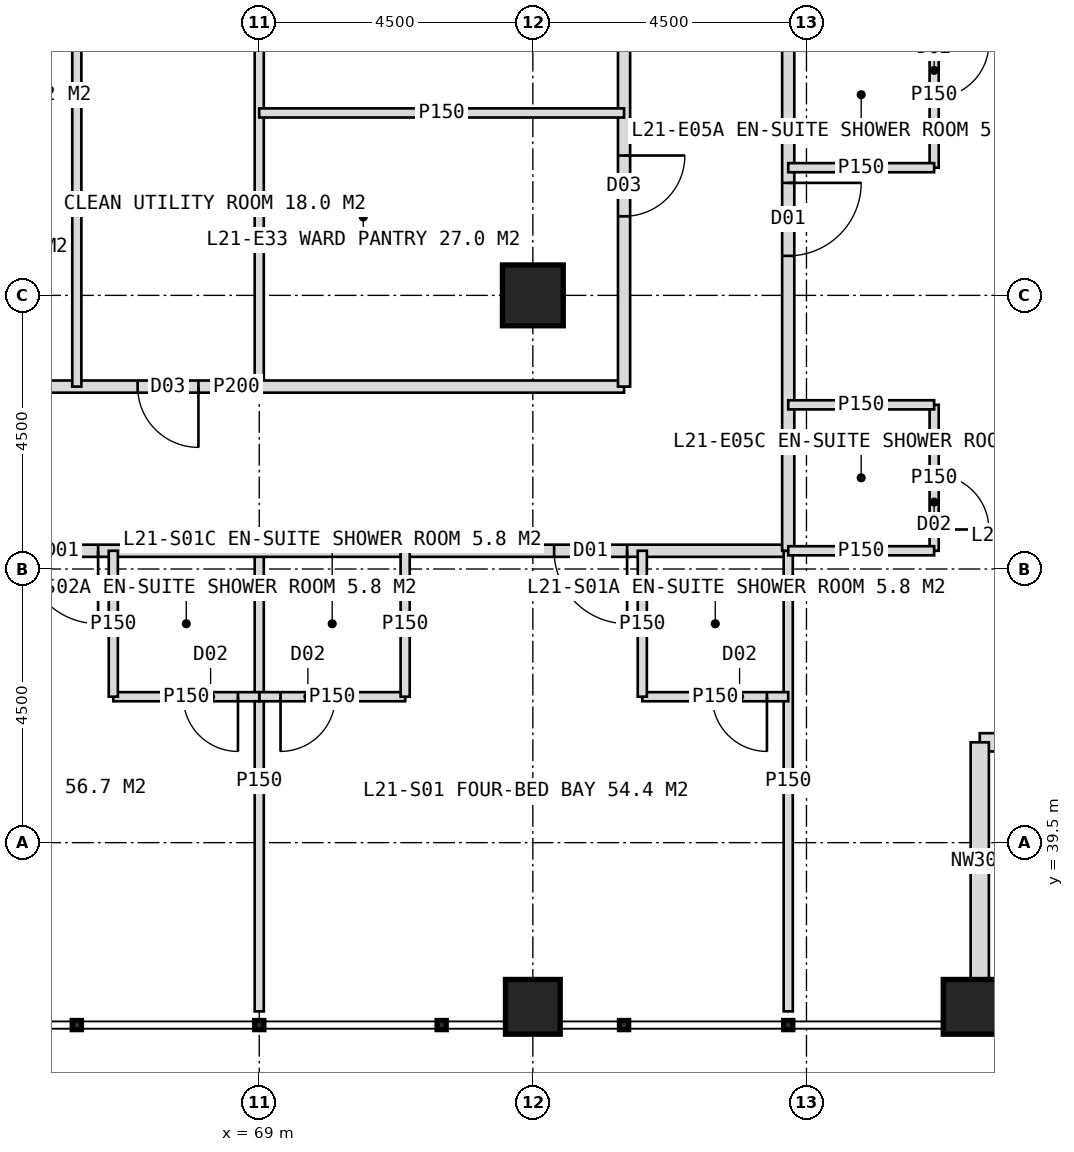
"""IFC4 building model, lengths in metres.
Left out: names, types, materials, properties, quantities, classifications, styles, units other than length and angle.
Written with IfcOpenShell. Run it as: python <this file> out.ifc"""

import sys

from ifc_helpers import new_model, si_unit, direction, frame, frame_2d, origin, origin_2d, place, context, subcontext, project, spatial, rectangle, hollow_rectangle, extrude, element, fill, save


model = new_model("IFC4")
c1 = context("Model", 3, precision=1e-05, world=origin(), true_north=direction((0.0, 1.0)))
c2 = subcontext(c1, "Body", "Model", "MODEL_VIEW")
j1 = project(units=[si_unit("LENGTHUNIT", "METRE"), si_unit("PLANEANGLEUNIT", "RADIAN")], contexts=[c1])
p1 = place(None, origin())
s1 = spatial("IfcSite", under=j1, at=p1, CompositionType="ELEMENT")
p2 = place(p1, origin())
s2 = spatial("IfcBuilding", under=s1, at=p2, CompositionType="ELEMENT")
p3 = place(p2, frame((0.0, 0.0, 91.0)))
s3 = spatial("IfcBuildingStorey", under=s2, at=p3, CompositionType="ELEMENT", Elevation=91.0)
p4 = place(p3, frame((73.5, 48.5, 0.0), z_axis=(0.0, 0.0, 1.0), x_axis=(1.0, 0.0, 0.0)))
e1 = element("IfcColumn", 1, at=p4, inside=s3, PredefinedType="COLUMN", context=c2, shape_type="SweptSolid", body=[
    extrude(hollow_rectangle(XDim=1.0, YDim=1.0, WallThickness=0.1, at=origin_2d()), origin(), (0.0, 0.0, 1.0), 4.0),
])
for number, where, z_axis, x_axis in (
    (2, (73.5, 36.8, 0.0), (0.0, 0.0, 1.0), (1.0, 0.0, 0.0)),
    (3, (80.7, 36.8, 0.0), (0.0, 0.0, 1.0), (1.0, 0.0, 0.0)),
):
    element("IfcColumn", number, at=place(p3, frame(where, z_axis=z_axis, x_axis=x_axis)), inside=s3, PredefinedType="COLUMN", context=c2, shape_type="SweptSolid", body=[
        extrude(hollow_rectangle(XDim=0.9, YDim=0.9, WallThickness=0.08, at=origin_2d()), origin(), (0.0, 0.0, 1.0), 4.0),
    ])
for number, where, z_axis, x_axis in (
    (4, (84.75, 41.15, 0.0), (0.0, 0.0, 1.0), (-1.0, 0.0, 0.0)),
    (5, (80.85, 41.15, 0.0), (0.0, 0.0, 1.0), (0.0, -1.0, 0.0)),
):
    element("IfcWall", number, at=place(p3, frame(where, z_axis=z_axis, x_axis=x_axis)), inside=s3, PredefinedType="ELEMENTEDWALL", context=c2, shape_type="SweptSolid", body=[
        extrude(rectangle(XDim=3.9, YDim=0.3, at=frame_2d((1.95, 0.0))), origin(), (0.0, 0.0, 1.0), 2.95),
    ])
p5 = place(p3, frame((69.0, 44.3, 0.0), z_axis=(0.0, 0.0, 1.0), x_axis=(0.0, -1.0, 0.0)))
e6 = element("IfcWall", 6, at=p5, inside=s3, PredefinedType="PARTITIONING", context=c2, shape_type="SweptSolid", body=[
    extrude(rectangle(XDim=7.575, YDim=0.15, at=frame_2d((3.788, 0.0))), origin(), (0.0, 0.0, 1.0), 3.75),
])
p6 = place(p3, frame((77.7, 44.3, 0.0), z_axis=(0.0, 0.0, 1.0), x_axis=(-1.0, 0.0, 0.0)))
e7 = element("IfcWall", 7, at=p6, inside=s3, PredefinedType="PARTITIONING", context=c2, shape_type="SweptSolid", body=[
    extrude(rectangle(XDim=35.4, YDim=0.2, at=frame_2d((17.7, 0.0))), origin(), (0.0, 0.0, 1.0), 3.75),
])
p7 = place(p6, frame((2.65, 0.0, 0.0)))
e8 = element("IfcOpeningElement", 8, at=p7, cuts=e7, PredefinedType="OPENING", context=c2, shape_type="SweptSolid", body=[
    extrude(rectangle(XDim=1.2, YDim=2.2, at=frame_2d((0.6, 1.1))), frame((0.0, 0.11, 0.0), z_axis=(0.0, -1.0, 0.0), x_axis=(1.0, 0.0, 0.0)), (0.0, 0.0, 1.0), 0.22),
])
p8 = place(p6, frame((11.35, 0.0, 0.0)))
e9 = element("IfcOpeningElement", 9, at=p8, cuts=e7, PredefinedType="OPENING", context=c2, shape_type="SweptSolid", body=[
    extrude(rectangle(XDim=1.2, YDim=2.2, at=frame_2d((0.6, 1.1))), frame((0.0, 0.11, 0.0), z_axis=(0.0, -1.0, 0.0), x_axis=(1.0, 0.0, 0.0)), (0.0, 0.0, 1.0), 0.22),
])
p9 = place(p6, frame((20.35, 0.0, 0.0)))
e10 = element("IfcOpeningElement", 10, at=p9, cuts=e7, PredefinedType="OPENING", context=c2, shape_type="SweptSolid", body=[
    extrude(rectangle(XDim=1.2, YDim=2.2, at=frame_2d((0.6, 1.1))), frame((0.0, 0.11, 0.0), z_axis=(0.0, -1.0, 0.0), x_axis=(1.0, 0.0, 0.0)), (0.0, 0.0, 1.0), 0.22),
])
p10 = place(p6, frame((29.35, 0.0, 0.0)))
e11 = element("IfcOpeningElement", 11, at=p10, cuts=e7, PredefinedType="OPENING", context=c2, shape_type="SweptSolid", body=[
    extrude(rectangle(XDim=1.2, YDim=2.2, at=frame_2d((0.6, 1.1))), frame((0.0, 0.11, 0.0), z_axis=(0.0, -1.0, 0.0), x_axis=(1.0, 0.0, 0.0)), (0.0, 0.0, 1.0), 0.22),
])
p11 = place(p3, frame((77.7, 44.3, 0.0), z_axis=(0.0, 0.0, 1.0), x_axis=(0.0, -1.0, 0.0)))
e12 = element("IfcWall", 12, at=p11, inside=s3, PredefinedType="PARTITIONING", context=c2, shape_type="SweptSolid", body=[
    extrude(rectangle(XDim=7.575, YDim=0.15, at=frame_2d((3.788, 0.0))), origin(), (0.0, 0.0, 1.0), 3.75),
])
p12 = place(p3, frame((77.7, 41.9, 0.0), z_axis=(0.0, 0.0, 1.0), x_axis=(-1.0, 0.0, 0.0)))
e13 = element("IfcWall", 13, at=p12, inside=s3, PredefinedType="PARTITIONING", context=c2, shape_type="SweptSolid", body=[
    extrude(rectangle(XDim=2.4, YDim=0.15, at=frame_2d((1.2, 0.0))), origin(), (0.0, 0.0, 1.0), 3.75),
])
p13 = place(p12, frame((0.35, 0.0, 0.0)))
e14 = element("IfcOpeningElement", 14, at=p13, cuts=e13, PredefinedType="OPENING", context=c2, shape_type="SweptSolid", body=[
    extrude(rectangle(XDim=0.9, YDim=2.1, at=frame_2d((0.45, 1.05))), frame((0.0, 0.085, 0.0), z_axis=(0.0, -1.0, 0.0), x_axis=(1.0, 0.0, 0.0)), (0.0, 0.0, 1.0), 0.17),
])
p14 = place(p3, frame((75.3, 44.3, 0.0), z_axis=(0.0, 0.0, 1.0), x_axis=(0.0, -1.0, 0.0)))
e15 = element("IfcWall", 15, at=p14, inside=s3, PredefinedType="PARTITIONING", context=c2, shape_type="SweptSolid", body=[
    extrude(rectangle(XDim=2.4, YDim=0.15, at=frame_2d((1.2, 0.0))), origin(), (0.0, 0.0, 1.0), 3.75),
])
p15 = place(p3, frame((71.4, 41.9, 0.0), z_axis=(0.0, 0.0, 1.0), x_axis=(-1.0, 0.0, 0.0)))
e16 = element("IfcWall", 16, at=p15, inside=s3, PredefinedType="PARTITIONING", context=c2, shape_type="SweptSolid", body=[
    extrude(rectangle(XDim=2.4, YDim=0.15, at=frame_2d((1.2, 0.0))), origin(), (0.0, 0.0, 1.0), 3.75),
])
p16 = place(p15, frame((1.15, 0.0, 0.0)))
e17 = element("IfcOpeningElement", 17, at=p16, cuts=e16, PredefinedType="OPENING", context=c2, shape_type="SweptSolid", body=[
    extrude(rectangle(XDim=0.9, YDim=2.1, at=frame_2d((0.45, 1.05))), frame((0.0, 0.085, 0.0), z_axis=(0.0, -1.0, 0.0), x_axis=(1.0, 0.0, 0.0)), (0.0, 0.0, 1.0), 0.17),
])
p17 = place(p3, frame((71.4, 44.3, 0.0), z_axis=(0.0, 0.0, 1.0), x_axis=(0.0, -1.0, 0.0)))
e18 = element("IfcWall", 18, at=p17, inside=s3, PredefinedType="PARTITIONING", context=c2, shape_type="SweptSolid", body=[
    extrude(rectangle(XDim=2.4, YDim=0.15, at=frame_2d((1.2, 0.0))), origin(), (0.0, 0.0, 1.0), 3.75),
])
p18 = place(p3, frame((69.0, 41.9, 0.0), z_axis=(0.0, 0.0, 1.0), x_axis=(-1.0, 0.0, 0.0)))
e19 = element("IfcWall", 19, at=p18, inside=s3, PredefinedType="PARTITIONING", context=c2, shape_type="SweptSolid", body=[
    extrude(rectangle(XDim=2.4, YDim=0.15, at=frame_2d((1.2, 0.0))), origin(), (0.0, 0.0, 1.0), 3.75),
])
p19 = place(p18, frame((0.35, 0.0, 0.0)))
e20 = element("IfcOpeningElement", 20, at=p19, cuts=e19, PredefinedType="OPENING", context=c2, shape_type="SweptSolid", body=[
    extrude(rectangle(XDim=0.9, YDim=2.1, at=frame_2d((0.45, 1.05))), frame((0.0, 0.085, 0.0), z_axis=(0.0, -1.0, 0.0), x_axis=(1.0, 0.0, 0.0)), (0.0, 0.0, 1.0), 0.17),
])
p20 = place(p3, frame((66.6, 44.3, 0.0), z_axis=(0.0, 0.0, 1.0), x_axis=(0.0, -1.0, 0.0)))
e21 = element("IfcWall", 21, at=p20, inside=s3, PredefinedType="PARTITIONING", context=c2, shape_type="SweptSolid", body=[
    extrude(rectangle(XDim=2.4, YDim=0.15, at=frame_2d((1.2, 0.0))), origin(), (0.0, 0.0, 1.0), 3.75),
])
p21 = place(p3, frame((69.0, 53.0, 0.0), z_axis=(0.0, 0.0, 1.0), x_axis=(0.0, -1.0, 0.0)))
e22 = element("IfcWall", 22, at=p21, inside=s3, PredefinedType="PARTITIONING", context=c2, shape_type="SweptSolid", body=[
    extrude(rectangle(XDim=6.0, YDim=0.15, at=frame_2d((3.0, 0.0))), origin(), (0.0, 0.0, 1.0), 3.75),
])
p22 = place(p3, frame((75.0, 47.0, 0.0), z_axis=(0.0, 0.0, 1.0), x_axis=(-1.0, 0.0, 0.0)))
e23 = element("IfcWall", 23, at=p22, inside=s3, PredefinedType="PARTITIONING", context=c2, shape_type="SweptSolid", body=[
    extrude(rectangle(XDim=12.75, YDim=0.2, at=frame_2d((6.375, 0.0))), origin(), (0.0, 0.0, 1.0), 3.75),
])
p23 = place(p22, frame((7.0, 0.0, 0.0)))
e24 = element("IfcOpeningElement", 24, at=p23, cuts=e23, PredefinedType="OPENING", context=c2, shape_type="SweptSolid", body=[
    extrude(rectangle(XDim=1.0, YDim=2.1, at=frame_2d((0.5, 1.05))), frame((0.0, 0.11, 0.0), z_axis=(0.0, -1.0, 0.0), x_axis=(1.0, 0.0, 0.0)), (0.0, 0.0, 1.0), 0.22),
])
p24 = place(p22, frame((11.425, 0.0, 0.0)))
e25 = element("IfcOpeningElement", 25, at=p24, cuts=e23, PredefinedType="OPENING", context=c2, shape_type="SweptSolid", body=[
    extrude(rectangle(XDim=1.0, YDim=2.1, at=frame_2d((0.5, 1.05))), frame((0.0, 0.11, 0.0), z_axis=(0.0, -1.0, 0.0), x_axis=(1.0, 0.0, 0.0)), (0.0, 0.0, 1.0), 0.22),
])
p25 = place(p3, frame((66.0, 53.0, 0.0), z_axis=(0.0, 0.0, 1.0), x_axis=(0.0, -1.0, 0.0)))
e26 = element("IfcWall", 26, at=p25, inside=s3, PredefinedType="PARTITIONING", context=c2, shape_type="SweptSolid", body=[
    extrude(rectangle(XDim=6.0, YDim=0.15, at=frame_2d((3.0, 0.0))), origin(), (0.0, 0.0, 1.0), 3.75),
])
p26 = place(p3, frame((77.7, 79.7, 0.0), z_axis=(0.0, 0.0, 1.0), x_axis=(0.0, -1.0, 0.0)))
e27 = element("IfcWall", 27, at=p26, inside=s3, PredefinedType="PARTITIONING", context=c2, shape_type="SweptSolid", body=[
    extrude(rectangle(XDim=35.4, YDim=0.2, at=frame_2d((17.7, 0.0))), origin(), (0.0, 0.0, 1.0), 3.75),
])
p27 = place(p26, frame((2.65, 0.0, 0.0)))
e28 = element("IfcOpeningElement", 28, at=p27, cuts=e27, PredefinedType="OPENING", context=c2, shape_type="SweptSolid", body=[
    extrude(rectangle(XDim=1.2, YDim=2.2, at=frame_2d((0.6, 1.1))), frame((0.0, 0.11, 0.0), z_axis=(0.0, -1.0, 0.0), x_axis=(1.0, 0.0, 0.0)), (0.0, 0.0, 1.0), 0.22),
])
p28 = place(p26, frame((8.35, 0.0, 0.0)))
e29 = element("IfcOpeningElement", 29, at=p28, cuts=e27, PredefinedType="OPENING", context=c2, shape_type="SweptSolid", body=[
    extrude(rectangle(XDim=1.2, YDim=2.2, at=frame_2d((0.6, 1.1))), frame((0.0, 0.11, 0.0), z_axis=(0.0, -1.0, 0.0), x_axis=(1.0, 0.0, 0.0)), (0.0, 0.0, 1.0), 0.22),
])
p29 = place(p26, frame((14.35, 0.0, 0.0)))
e30 = element("IfcOpeningElement", 30, at=p29, cuts=e27, PredefinedType="OPENING", context=c2, shape_type="SweptSolid", body=[
    extrude(rectangle(XDim=1.2, YDim=2.2, at=frame_2d((0.6, 1.1))), frame((0.0, 0.11, 0.0), z_axis=(0.0, -1.0, 0.0), x_axis=(1.0, 0.0, 0.0)), (0.0, 0.0, 1.0), 0.22),
])
p30 = place(p26, frame((20.35, 0.0, 0.0)))
e31 = element("IfcOpeningElement", 31, at=p30, cuts=e27, PredefinedType="OPENING", context=c2, shape_type="SweptSolid", body=[
    extrude(rectangle(XDim=1.2, YDim=2.2, at=frame_2d((0.6, 1.1))), frame((0.0, 0.11, 0.0), z_axis=(0.0, -1.0, 0.0), x_axis=(1.0, 0.0, 0.0)), (0.0, 0.0, 1.0), 0.22),
])
p31 = place(p26, frame((29.35, 0.0, 0.0)))
e32 = element("IfcOpeningElement", 32, at=p31, cuts=e27, PredefinedType="OPENING", context=c2, shape_type="SweptSolid", body=[
    extrude(rectangle(XDim=1.2, YDim=2.2, at=frame_2d((0.6, 1.1))), frame((0.0, 0.11, 0.0), z_axis=(0.0, -1.0, 0.0), x_axis=(1.0, 0.0, 0.0)), (0.0, 0.0, 1.0), 0.22),
])
p32 = place(p3, frame((80.1, 53.0, 0.0), z_axis=(0.0, 0.0, 1.0), x_axis=(0.0, -1.0, 0.0)))
e33 = element("IfcWall", 33, at=p32, inside=s3, PredefinedType="PARTITIONING", context=c2, shape_type="SweptSolid", body=[
    extrude(rectangle(XDim=2.4, YDim=0.15, at=frame_2d((1.2, 0.0))), origin(), (0.0, 0.0, 1.0), 3.75),
])
p33 = place(p32, frame((0.35, 0.0, 0.0)))
e34 = element("IfcOpeningElement", 34, at=p33, cuts=e33, PredefinedType="OPENING", context=c2, shape_type="SweptSolid", body=[
    extrude(rectangle(XDim=0.9, YDim=2.1, at=frame_2d((0.45, 1.05))), frame((0.0, 0.085, 0.0), z_axis=(0.0, -1.0, 0.0), x_axis=(1.0, 0.0, 0.0)), (0.0, 0.0, 1.0), 0.17),
])
p34 = place(p3, frame((77.7, 50.6, 0.0), z_axis=(0.0, 0.0, 1.0), x_axis=(1.0, 0.0, 0.0)))
e35 = element("IfcWall", 35, at=p34, inside=s3, PredefinedType="PARTITIONING", context=c2, shape_type="SweptSolid", body=[
    extrude(rectangle(XDim=2.4, YDim=0.15, at=frame_2d((1.2, 0.0))), origin(), (0.0, 0.0, 1.0), 3.75),
])
p35 = place(p3, frame((80.1, 46.7, 0.0), z_axis=(0.0, 0.0, 1.0), x_axis=(0.0, -1.0, 0.0)))
e36 = element("IfcWall", 36, at=p35, inside=s3, PredefinedType="PARTITIONING", context=c2, shape_type="SweptSolid", body=[
    extrude(rectangle(XDim=2.4, YDim=0.15, at=frame_2d((1.2, 0.0))), origin(), (0.0, 0.0, 1.0), 3.75),
])
p36 = place(p35, frame((1.15, 0.0, 0.0)))
e37 = element("IfcOpeningElement", 37, at=p36, cuts=e36, PredefinedType="OPENING", context=c2, shape_type="SweptSolid", body=[
    extrude(rectangle(XDim=0.9, YDim=2.1, at=frame_2d((0.45, 1.05))), frame((0.0, 0.085, 0.0), z_axis=(0.0, -1.0, 0.0), x_axis=(1.0, 0.0, 0.0)), (0.0, 0.0, 1.0), 0.17),
])
for number, where, z_axis, x_axis in (
    (38, (77.7, 46.7, 0.0), (0.0, 0.0, 1.0), (1.0, 0.0, 0.0)),
    (39, (77.7, 44.3, 0.0), (0.0, 0.0, 1.0), (1.0, 0.0, 0.0)),
):
    element("IfcWall", number, at=place(p3, frame(where, z_axis=z_axis, x_axis=x_axis)), inside=s3, PredefinedType="PARTITIONING", context=c2, shape_type="SweptSolid", body=[
        extrude(rectangle(XDim=2.4, YDim=0.15, at=frame_2d((1.2, 0.0))), origin(), (0.0, 0.0, 1.0), 3.75),
    ])
p37 = place(p3, frame((75.0, 62.0, 0.0), z_axis=(0.0, 0.0, 1.0), x_axis=(0.0, -1.0, 0.0)))
e40 = element("IfcWall", 40, at=p37, inside=s3, PredefinedType="PARTITIONING", context=c2, shape_type="SweptSolid", body=[
    extrude(rectangle(XDim=15.0, YDim=0.2, at=frame_2d((7.5, 0.0))), origin(), (0.0, 0.0, 1.0), 3.75),
])
p38 = place(p37, frame((7.3, 0.0, 0.0)))
e41 = element("IfcOpeningElement", 41, at=p38, cuts=e40, PredefinedType="OPENING", context=c2, shape_type="SweptSolid", body=[
    extrude(rectangle(XDim=1.0, YDim=2.1, at=frame_2d((0.5, 1.05))), frame((0.0, 0.11, 0.0), z_axis=(0.0, -1.0, 0.0), x_axis=(1.0, 0.0, 0.0)), (0.0, 0.0, 1.0), 0.22),
])
p39 = place(p37, frame((11.2, 0.0, 0.0)))
e42 = element("IfcOpeningElement", 42, at=p39, cuts=e40, PredefinedType="OPENING", context=c2, shape_type="SweptSolid", body=[
    extrude(rectangle(XDim=1.0, YDim=2.1, at=frame_2d((0.5, 1.05))), frame((0.0, 0.11, 0.0), z_axis=(0.0, -1.0, 0.0), x_axis=(1.0, 0.0, 0.0)), (0.0, 0.0, 1.0), 0.22),
])
p40 = place(p3, frame((69.0, 51.5, 0.0), z_axis=(0.0, 0.0, 1.0), x_axis=(1.0, 0.0, 0.0)))
e43 = element("IfcWall", 43, at=p40, inside=s3, PredefinedType="PARTITIONING", context=c2, shape_type="SweptSolid", body=[
    extrude(rectangle(XDim=6.0, YDim=0.15, at=frame_2d((3.0, 0.0))), origin(), (0.0, 0.0, 1.0), 3.75),
])
p41 = place(p7, origin())
e44 = element("IfcDoor", 44, at=p41, inside=s3, OperationType="SINGLE_SWING_LEFT", PredefinedType="DOOR", context=c2, shape_type="SweptSolid", body=[
    extrude(rectangle(XDim=1.2, YDim=2.2, at=frame_2d((0.6, 1.1))), frame((0.0, 0.025, 0.0), z_axis=(0.0, -1.0, 0.0), x_axis=(1.0, 0.0, 0.0)), (0.0, 0.0, 1.0), 0.05),
])
fill(e8, e44)
p42 = place(p13, origin())
e45 = element("IfcDoor", 45, at=p42, inside=s3, OperationType="SINGLE_SWING_LEFT", PredefinedType="DOOR", context=c2, shape_type="SweptSolid", body=[
    extrude(rectangle(XDim=0.9, YDim=2.1, at=frame_2d((0.45, 1.05))), frame((0.0, 0.025, 0.0), z_axis=(0.0, -1.0, 0.0), x_axis=(1.0, 0.0, 0.0)), (0.0, 0.0, 1.0), 0.05),
])
fill(e14, e45)
p43 = place(p16, origin())
e46 = element("IfcDoor", 46, at=p43, inside=s3, OperationType="SINGLE_SWING_RIGHT", PredefinedType="DOOR", context=c2, shape_type="SweptSolid", body=[
    extrude(rectangle(XDim=0.9, YDim=2.1, at=frame_2d((0.45, 1.05))), frame((0.0, 0.025, 0.0), z_axis=(0.0, -1.0, 0.0), x_axis=(1.0, 0.0, 0.0)), (0.0, 0.0, 1.0), 0.05),
])
fill(e17, e46)
p44 = place(p8, origin())
e47 = element("IfcDoor", 47, at=p44, inside=s3, OperationType="SINGLE_SWING_LEFT", PredefinedType="DOOR", context=c2, shape_type="SweptSolid", body=[
    extrude(rectangle(XDim=1.2, YDim=2.2, at=frame_2d((0.6, 1.1))), frame((0.0, 0.025, 0.0), z_axis=(0.0, -1.0, 0.0), x_axis=(1.0, 0.0, 0.0)), (0.0, 0.0, 1.0), 0.05),
])
fill(e9, e47)
p45 = place(p19, origin())
e48 = element("IfcDoor", 48, at=p45, inside=s3, OperationType="SINGLE_SWING_LEFT", PredefinedType="DOOR", context=c2, shape_type="SweptSolid", body=[
    extrude(rectangle(XDim=0.9, YDim=2.1, at=frame_2d((0.45, 1.05))), frame((0.0, 0.025, 0.0), z_axis=(0.0, -1.0, 0.0), x_axis=(1.0, 0.0, 0.0)), (0.0, 0.0, 1.0), 0.05),
])
fill(e20, e48)
p46 = place(p23, origin())
e49 = element("IfcDoor", 49, at=p46, inside=s3, OperationType="SINGLE_SWING_LEFT", PredefinedType="DOOR", context=c2, shape_type="SweptSolid", body=[
    extrude(rectangle(XDim=1.0, YDim=2.1, at=frame_2d((0.5, 1.05))), frame((0.0, 0.025, 0.0), z_axis=(0.0, -1.0, 0.0), x_axis=(1.0, 0.0, 0.0)), (0.0, 0.0, 1.0), 0.05),
])
fill(e24, e49)
p47 = place(p31, origin())
e50 = element("IfcDoor", 50, at=p47, inside=s3, OperationType="SINGLE_SWING_LEFT", PredefinedType="DOOR", context=c2, shape_type="SweptSolid", body=[
    extrude(rectangle(XDim=1.2, YDim=2.2, at=frame_2d((0.6, 1.1))), frame((0.0, 0.025, 0.0), z_axis=(0.0, -1.0, 0.0), x_axis=(1.0, 0.0, 0.0)), (0.0, 0.0, 1.0), 0.05),
])
fill(e32, e50)
p48 = place(p33, origin())
e51 = element("IfcDoor", 51, at=p48, inside=s3, OperationType="SINGLE_SWING_LEFT", PredefinedType="DOOR", context=c2, shape_type="SweptSolid", body=[
    extrude(rectangle(XDim=0.9, YDim=2.1, at=frame_2d((0.45, 1.05))), frame((0.0, 0.025, 0.0), z_axis=(0.0, -1.0, 0.0), x_axis=(1.0, 0.0, 0.0)), (0.0, 0.0, 1.0), 0.05),
])
fill(e34, e51)
p49 = place(p36, origin())
e52 = element("IfcDoor", 52, at=p49, inside=s3, OperationType="SINGLE_SWING_RIGHT", PredefinedType="DOOR", context=c2, shape_type="SweptSolid", body=[
    extrude(rectangle(XDim=0.9, YDim=2.1, at=frame_2d((0.45, 1.05))), frame((0.0, 0.025, 0.0), z_axis=(0.0, -1.0, 0.0), x_axis=(1.0, 0.0, 0.0)), (0.0, 0.0, 1.0), 0.05),
])
fill(e37, e52)
p50 = place(p39, origin())
e53 = element("IfcDoor", 53, at=p50, inside=s3, OperationType="SINGLE_SWING_LEFT", PredefinedType="DOOR", context=c2, shape_type="SweptSolid", body=[
    extrude(rectangle(XDim=1.0, YDim=2.1, at=frame_2d((0.5, 1.05))), frame((0.0, 0.025, 0.0), z_axis=(0.0, -1.0, 0.0), x_axis=(1.0, 0.0, 0.0)), (0.0, 0.0, 1.0), 0.05),
])
fill(e42, e53)
save(model, sys.argv[1])
